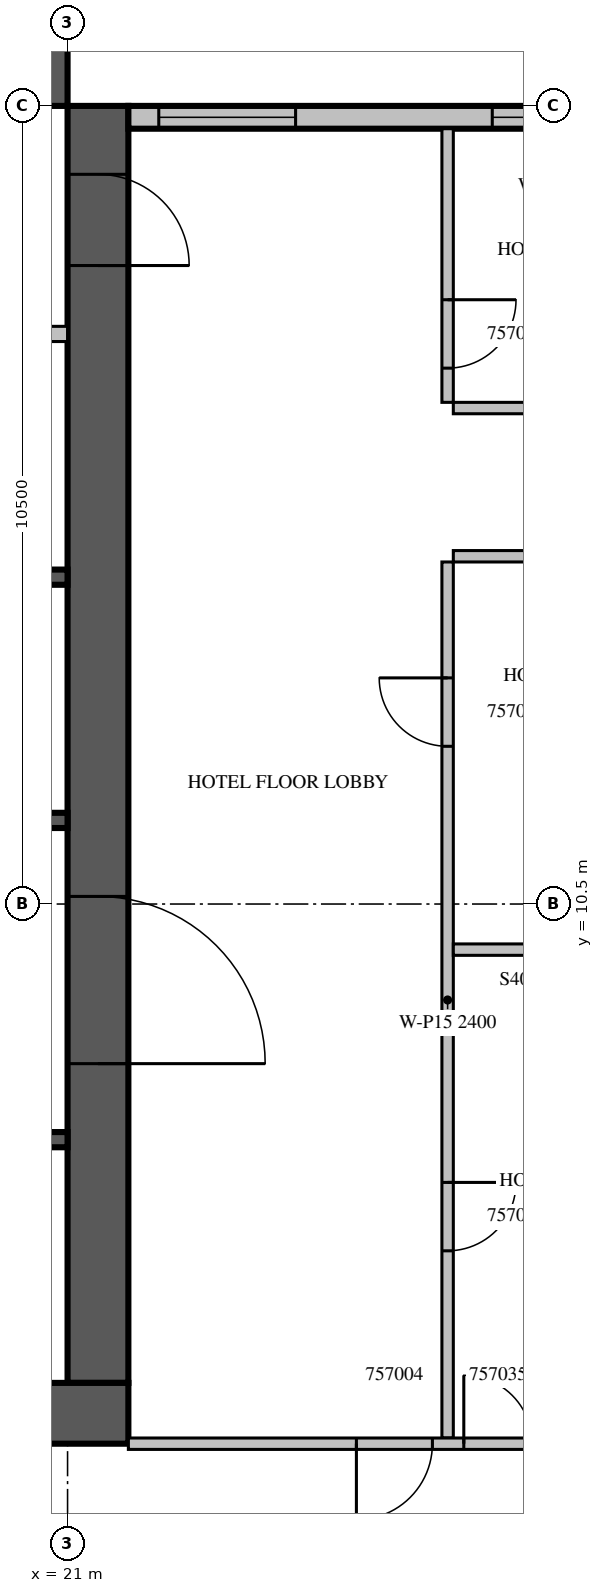
"""IFC4 building model, lengths in metres.
Left out: names, types, materials, properties, quantities, classifications, styles, units other than length and angle.
Written with IfcOpenShell. Run it as: python <this file> out.ifc"""

import sys

from ifc_helpers import new_model, si_unit, direction, frame, frame_2d, origin, place, context, subcontext, project, spatial, rectangle, extrude, source, transform, mapped, element, fill, save


model = new_model("IFC4")
c1 = context("Model", 3, precision=1e-05, world=origin(), true_north=direction((0.0, 1.0)))
c2 = subcontext(c1, "Body", "Model", "MODEL_VIEW")
j1 = project(units=[si_unit("LENGTHUNIT", "METRE"), si_unit("PLANEANGLEUNIT", "RADIAN")], contexts=[c1])
p1 = place(None, origin())
s1 = spatial("IfcSite", under=j1, at=p1, CompositionType="ELEMENT")
p2 = place(p1, origin())
s2 = spatial("IfcBuilding", under=s1, at=p2, CompositionType="ELEMENT")
p3 = place(p2, frame((0.0, 0.0, 250.0)))
s3 = spatial("IfcBuildingStorey", under=s2, at=p3, CompositionType="ELEMENT", Elevation=250.0)
m1 = source(origin(), c2, "Body", "SweptSolid", [
    extrude(rectangle(XDim=16.8, YDim=0.8, at=frame_2d((8.4, 0.0))), origin(), (0.0, 0.0, 1.0), 3.8),
])
p4 = place(p3, frame((21.4, 4.2, 0.0), z_axis=(0.0, 0.0, 1.0), x_axis=(0.0, 1.0, 0.0)))
e1 = element("IfcWall", 1, at=p4, inside=s3, PredefinedType="SHEAR", context=c2, shape_type="MappedRepresentation", body=[
    mapped(m1, transform((0.0, 0.0, 0.0), scale=1.0)),
])
m2 = source(origin(), c2, "Body", "SweptSolid", [
    extrude(rectangle(XDim=2.2, YDim=2.1, at=frame_2d((1.1, 1.05))), frame((0.0, 0.41, 0.0), z_axis=(0.0, -1.0, 0.0), x_axis=(1.0, 0.0, 0.0)), (0.0, 0.0, 1.0), 0.82),
])
p5 = place(p4, frame((4.2, 0.0, 0.0)))
e2 = element("IfcOpeningElement", 2, at=p5, cuts=e1, PredefinedType="OPENING", context=c2, shape_type="MappedRepresentation", body=[
    mapped(m2, transform((0.0, 0.0, 0.0), scale=1.0)),
])
m3 = source(origin(), c2, "Body", "SweptSolid", [
    extrude(rectangle(XDim=1.2, YDim=2.1, at=frame_2d((0.6, 1.05))), frame((0.0, 0.41, 0.0), z_axis=(0.0, -1.0, 0.0), x_axis=(1.0, 0.0, 0.0)), (0.0, 0.0, 1.0), 0.82),
])
p6 = place(p4, frame((14.7, 0.0, 0.0)))
e3 = element("IfcOpeningElement", 3, at=p6, cuts=e1, PredefinedType="OPENING", context=c2, shape_type="MappedRepresentation", body=[
    mapped(m3, transform((0.0, 0.0, 0.0), scale=1.0)),
])
m4 = source(origin(), c2, "Body", "SweptSolid", [
    extrude(rectangle(XDim=17.6, YDim=0.8, at=frame_2d((8.8, 0.0))), origin(), (0.0, 0.0, 1.0), 3.8),
])
p7 = place(p3, frame((4.2, 3.8, 0.0), z_axis=(0.0, 0.0, 1.0), x_axis=(1.0, 0.0, 0.0)))
e4 = element("IfcWall", 4, at=p7, inside=s3, PredefinedType="SHEAR", context=c2, shape_type="MappedRepresentation", body=[
    mapped(m4, transform((0.0, 0.0, 0.0), scale=1.0)),
])
m5 = source(origin(), c2, "Body", "SweptSolid", [
    extrude(rectangle(XDim=0.9, YDim=2.1, at=frame_2d((0.45, 1.05))), frame((0.0, 0.41, 0.0), z_axis=(0.0, -1.0, 0.0), x_axis=(1.0, 0.0, 0.0)), (0.0, 0.0, 1.0), 0.82),
])
p8 = place(p7, frame((11.55, 0.0, 0.0)))
e5 = element("IfcOpeningElement", 5, at=p8, cuts=e4, PredefinedType="OPENING", context=c2, shape_type="MappedRepresentation", body=[
    mapped(m5, transform((0.0, 0.0, 0.0), scale=1.0)),
])
p9 = place(p3, frame((4.2, 21.4, 0.0), z_axis=(0.0, 0.0, 1.0), x_axis=(1.0, 0.0, 0.0)))
e6 = element("IfcWall", 6, at=p9, inside=s3, PredefinedType="SHEAR", context=c2, shape_type="MappedRepresentation", body=[
    mapped(m1, transform((0.0, 0.0, 0.0), scale=1.0)),
])
p10 = place(p9, frame((6.2, 0.0, 0.0)))
e7 = element("IfcOpeningElement", 7, at=p10, cuts=e6, PredefinedType="OPENING", context=c2, shape_type="MappedRepresentation", body=[
    mapped(m3, transform((0.0, 0.0, 0.0), scale=1.0)),
])
m6 = source(origin(), c2, "Body", "SweptSolid", [
    extrude(rectangle(XDim=7.2, YDim=0.3, at=frame_2d((3.6, 0.0))), origin(), (0.0, 0.0, 1.0), 3.4),
])
p11 = place(p3, frame((29.0, 20.85, 0.0), z_axis=(0.0, 0.0, 1.0), x_axis=(-1.0, 0.0, 0.0)))
e8 = element("IfcWall", 8, at=p11, inside=s3, PredefinedType="STANDARD", context=c2, shape_type="MappedRepresentation", body=[
    mapped(m6, transform((0.0, 0.0, 0.0), scale=1.0)),
])
m7 = source(origin(), c2, "Body", "SweptSolid", [
    extrude(rectangle(XDim=1.8, YDim=2.3, at=frame_2d((0.9, 1.15))), frame((0.0, 0.16, 0.0), z_axis=(0.0, -1.0, 0.0), x_axis=(1.0, 0.0, 0.0)), (0.0, 0.0, 1.0), 0.32),
])
p12 = place(p11, frame((0.613, 0.0, 0.6)))
e9 = element("IfcOpeningElement", 9, at=p12, cuts=e8, PredefinedType="OPENING", context=c2, shape_type="MappedRepresentation", body=[
    mapped(m7, transform((0.0, 0.0, 0.0), scale=1.0)),
])
p13 = place(p11, frame((5.0, 0.0, 0.6)))
e10 = element("IfcOpeningElement", 10, at=p13, cuts=e8, PredefinedType="OPENING", context=c2, shape_type="MappedRepresentation", body=[
    mapped(m7, transform((0.0, 0.0, 0.0), scale=1.0)),
])
m8 = source(origin(), c2, "Body", "SweptSolid", [
    extrude(rectangle(XDim=2.4, YDim=0.2, at=frame_2d((1.2, 0.0))), origin(), (0.0, 0.0, 1.0), 3.8),
])
p14 = place(p3, frame((18.6, 7.4, 0.0), z_axis=(0.0, 0.0, 1.0), x_axis=(1.0, 0.0, 0.0)))
e11 = element("IfcWall", 11, at=p14, inside=s3, PredefinedType="SOLIDWALL", context=c2, shape_type="MappedRepresentation", body=[
    mapped(m8, transform((0.0, 0.0, 0.0), scale=1.0)),
])
m9 = source(origin(), c2, "Body", "SweptSolid", [
    extrude(rectangle(XDim=9.6, YDim=0.2, at=frame_2d((4.8, 0.0))), origin(), (0.0, 0.0, 1.0), 3.8),
])
p15 = place(p3, frame((11.4, 11.6, 0.0), z_axis=(0.0, 0.0, 1.0), x_axis=(1.0, 0.0, 0.0)))
e12 = element("IfcWall", 12, at=p15, inside=s3, PredefinedType="SOLIDWALL", context=c2, shape_type="MappedRepresentation", body=[
    mapped(m9, transform((0.0, 0.0, 0.0), scale=1.0)),
])
p16 = place(p3, frame((11.4, 14.8, 0.0), z_axis=(0.0, 0.0, 1.0), x_axis=(1.0, 0.0, 0.0)))
e13 = element("IfcWall", 13, at=p16, inside=s3, PredefinedType="SOLIDWALL", context=c2, shape_type="MappedRepresentation", body=[
    mapped(m9, transform((0.0, 0.0, 0.0), scale=1.0)),
])
m10 = source(origin(), c2, "Body", "SweptSolid", [
    extrude(rectangle(XDim=1.1, YDim=2.1, at=frame_2d((0.55, 1.05))), frame((0.0, 0.11, 0.0), z_axis=(0.0, -1.0, 0.0), x_axis=(1.0, 0.0, 0.0)), (0.0, 0.0, 1.0), 0.22),
])
p17 = place(p16, frame((3.05, 0.0, 0.0)))
e14 = element("IfcOpeningElement", 14, at=p17, cuts=e13, PredefinedType="OPENING", context=c2, shape_type="MappedRepresentation", body=[
    mapped(m10, transform((0.0, 0.0, 0.0), scale=1.0)),
])
p18 = place(p16, frame((5.45, 0.0, 0.0)))
e15 = element("IfcOpeningElement", 15, at=p18, cuts=e13, PredefinedType="OPENING", context=c2, shape_type="MappedRepresentation", body=[
    mapped(m10, transform((0.0, 0.0, 0.0), scale=1.0)),
])
p19 = place(p16, frame((7.85, 0.0, 0.0)))
e16 = element("IfcOpeningElement", 16, at=p19, cuts=e13, PredefinedType="OPENING", context=c2, shape_type="MappedRepresentation", body=[
    mapped(m10, transform((0.0, 0.0, 0.0), scale=1.0)),
])
m11 = source(origin(), c2, "Body", "SweptSolid", [
    extrude(rectangle(XDim=11.45, YDim=0.2, at=frame_2d((5.725, 0.0))), origin(), (0.0, 0.0, 1.0), 3.4),
])
p20 = place(p3, frame((9.55, 18.0, 0.0), z_axis=(0.0, 0.0, 1.0), x_axis=(1.0, 0.0, 0.0)))
e17 = element("IfcWall", 17, at=p20, inside=s3, PredefinedType="PARTITIONING", context=c2, shape_type="MappedRepresentation", body=[
    mapped(m11, transform((0.0, 0.0, 0.0), scale=1.0)),
])
m12 = source(origin(), c2, "Body", "SweptSolid", [
    extrude(rectangle(XDim=0.9, YDim=2.1, at=frame_2d((0.45, 1.05))), frame((0.0, 0.11, 0.0), z_axis=(0.0, -1.0, 0.0), x_axis=(1.0, 0.0, 0.0)), (0.0, 0.0, 1.0), 0.22),
])
p21 = place(p20, frame((0.725, 0.0, 0.0)))
e18 = element("IfcOpeningElement", 18, at=p21, cuts=e17, PredefinedType="OPENING", context=c2, shape_type="MappedRepresentation", body=[
    mapped(m12, transform((0.0, 0.0, 0.0), scale=1.0)),
])
p22 = place(p20, frame((2.775, 0.0, 0.0)))
e19 = element("IfcOpeningElement", 19, at=p22, cuts=e17, PredefinedType="OPENING", context=c2, shape_type="MappedRepresentation", body=[
    mapped(m12, transform((0.0, 0.0, 0.0), scale=1.0)),
])
p23 = place(p20, frame((7.35, 0.0, 0.0)))
e20 = element("IfcOpeningElement", 20, at=p23, cuts=e17, PredefinedType="OPENING", context=c2, shape_type="MappedRepresentation", body=[
    mapped(m10, transform((0.0, 0.0, 0.0), scale=1.0)),
])
m13 = source(origin(), c2, "Body", "SweptSolid", [
    extrude(rectangle(XDim=11.525, YDim=0.15, at=frame_2d((5.763, 0.0))), origin(), (0.0, 0.0, 1.0), 2.4),
])
p24 = place(p3, frame((26.0, 15.0, 0.0), z_axis=(0.0, 0.0, 1.0), x_axis=(0.0, -1.0, 0.0)))
e21 = element("IfcWall", 21, at=p24, inside=s3, PredefinedType="PARTITIONING", context=c2, shape_type="MappedRepresentation", body=[
    mapped(m13, transform((0.0, 0.0, 0.0), scale=1.0)),
])
m14 = source(origin(), c2, "Body", "SweptSolid", [
    extrude(rectangle(XDim=0.9, YDim=2.1, at=frame_2d((0.45, 1.05))), frame((0.0, 0.085, 0.0), z_axis=(0.0, -1.0, 0.0), x_axis=(1.0, 0.0, 0.0)), (0.0, 0.0, 1.0), 0.17),
])
p25 = place(p24, frame((8.162, 0.0, 0.0)))
e22 = element("IfcOpeningElement", 22, at=p25, cuts=e21, PredefinedType="OPENING", context=c2, shape_type="MappedRepresentation", body=[
    mapped(m14, transform((0.0, 0.0, 0.0), scale=1.0)),
])
p26 = place(p24, frame((1.525, 0.0, 0.0)))
e23 = element("IfcOpeningElement", 23, at=p26, cuts=e21, PredefinedType="OPENING", context=c2, shape_type="MappedRepresentation", body=[
    mapped(m14, transform((0.0, 0.0, 0.0), scale=1.0)),
])
m15 = source(origin(), c2, "Body", "SweptSolid", [
    extrude(rectangle(XDim=3.6, YDim=0.15, at=frame_2d((1.8, 0.0))), origin(), (0.0, 0.0, 1.0), 3.4),
])
p27 = place(p3, frame((26.0, 20.7, 0.0), z_axis=(0.0, 0.0, 1.0), x_axis=(0.0, -1.0, 0.0)))
e24 = element("IfcWall", 24, at=p27, inside=s3, PredefinedType="PARTITIONING", context=c2, shape_type="MappedRepresentation", body=[
    mapped(m15, transform((0.0, 0.0, 0.0), scale=1.0)),
])
p28 = place(p27, frame((2.25, 0.0, 0.0)))
e25 = element("IfcOpeningElement", 25, at=p28, cuts=e24, PredefinedType="OPENING", context=c2, shape_type="MappedRepresentation", body=[
    mapped(m14, transform((0.0, 0.0, 0.0), scale=1.0)),
])
m16 = source(origin(), c2, "Body", "SweptSolid", [
    extrude(rectangle(XDim=3.25, YDim=0.15, at=frame_2d((1.625, 0.0))), origin(), (0.0, 0.0, 1.0), 3.4),
])
for number, where, z_axis, x_axis in (
    (26, (29.325, 9.9, 0.0), (0.0, 0.0, 1.0), (-1.0, 0.0, 0.0)),
    (27, (29.325, 15.075, 0.0), (0.0, 0.0, 1.0), (-1.0, 0.0, 0.0)),
    (28, (26.075, 17.025, 0.0), (0.0, 0.0, 1.0), (1.0, 0.0, 0.0)),
):
    element("IfcWall", number, at=place(p3, frame(where, z_axis=z_axis, x_axis=x_axis)), inside=s3, PredefinedType="PARTITIONING", context=c2, shape_type="MappedRepresentation", body=[
        mapped(m16, transform((0.0, 0.0, 0.0), scale=1.0)),
    ])
m17 = source(origin(), c2, "Body", "SweptSolid", [
    extrude(rectangle(XDim=7.525, YDim=0.15, at=frame_2d((3.763, 0.0))), origin(), (0.0, 0.0, 1.0), 3.4),
])
p29 = place(p3, frame((21.8, 3.4, 0.0), z_axis=(0.0, 0.0, 1.0), x_axis=(1.0, 0.0, 0.0)))
e29 = element("IfcWall", 29, at=p29, inside=s3, PredefinedType="PARTITIONING", context=c2, shape_type="MappedRepresentation", body=[
    mapped(m17, transform((0.0, 0.0, 0.0), scale=1.0)),
])
m18 = source(origin(), c2, "Body", "SweptSolid", [
    extrude(rectangle(XDim=1.0, YDim=2.1, at=frame_2d((0.5, 1.05))), frame((0.0, 0.085, 0.0), z_axis=(0.0, -1.0, 0.0), x_axis=(1.0, 0.0, 0.0)), (0.0, 0.0, 1.0), 0.17),
])
p30 = place(p29, frame((3.0, 0.0, 0.0)))
e30 = element("IfcOpeningElement", 30, at=p30, cuts=e29, PredefinedType="OPENING", context=c2, shape_type="MappedRepresentation", body=[
    mapped(m18, transform((0.0, 0.0, 0.0), scale=1.0)),
])
p31 = place(p29, frame((4.413, 0.0, 0.0)))
e31 = element("IfcOpeningElement", 31, at=p31, cuts=e29, PredefinedType="OPENING", context=c2, shape_type="MappedRepresentation", body=[
    mapped(m14, transform((0.0, 0.0, 0.0), scale=1.0)),
])
m19 = source(origin(), c2, "Body", "SweptSolid", [
    extrude(rectangle(XDim=1.8, YDim=2.3, at=frame_2d((0.9, 1.15))), frame((0.0, 0.03, 0.0), z_axis=(0.0, -1.0, 0.0), x_axis=(1.0, 0.0, 0.0)), (0.0, 0.0, 1.0), 0.06),
])
p32 = place(p12, origin())
e32 = element("IfcWindow", 32, at=p32, inside=s3, PartitioningType="SINGLE_PANEL", PredefinedType="WINDOW", context=c2, shape_type="MappedRepresentation", body=[
    mapped(m19, transform((0.0, 0.0, 0.0), scale=1.0)),
])
fill(e9, e32)
p33 = place(p13, origin())
e33 = element("IfcWindow", 33, at=p33, inside=s3, PartitioningType="SINGLE_PANEL", PredefinedType="WINDOW", context=c2, shape_type="MappedRepresentation", body=[
    mapped(m19, transform((0.0, 0.0, 0.0), scale=1.0)),
])
fill(e10, e33)
m20 = source(origin(), c2, "Body", "SweptSolid", [
    extrude(rectangle(XDim=2.2, YDim=2.1, at=frame_2d((1.1, 1.05))), frame((0.0, 0.025, 0.0), z_axis=(0.0, -1.0, 0.0), x_axis=(1.0, 0.0, 0.0)), (0.0, 0.0, 1.0), 0.05),
])
p34 = place(p5, origin())
e34 = element("IfcDoor", 34, at=p34, inside=s3, OperationType="DOUBLE_DOOR_SINGLE_SWING", PredefinedType="DOOR", context=c2, shape_type="MappedRepresentation", body=[
    mapped(m20, transform((0.0, 0.0, 0.0), scale=1.0)),
])
fill(e2, e34)
m21 = source(origin(), c2, "Body", "SweptSolid", [
    extrude(rectangle(XDim=1.2, YDim=2.1, at=frame_2d((0.6, 1.05))), frame((0.0, 0.025, 0.0), z_axis=(0.0, -1.0, 0.0), x_axis=(1.0, 0.0, 0.0)), (0.0, 0.0, 1.0), 0.05),
])
p35 = place(p6, origin())
e35 = element("IfcDoor", 35, at=p35, inside=s3, OperationType="SINGLE_SWING_RIGHT", PredefinedType="DOOR", context=c2, shape_type="MappedRepresentation", body=[
    mapped(m21, transform((0.0, 0.0, 0.0), scale=1.0)),
])
fill(e3, e35)
m22 = source(origin(), c2, "Body", "SweptSolid", [
    extrude(rectangle(XDim=0.9, YDim=2.1, at=frame_2d((0.45, 1.05))), frame((0.0, 0.025, 0.0), z_axis=(0.0, -1.0, 0.0), x_axis=(1.0, 0.0, 0.0)), (0.0, 0.0, 1.0), 0.05),
])
p36 = place(p25, origin())
e36 = element("IfcDoor", 36, at=p36, inside=s3, OperationType="SINGLE_SWING_LEFT", PredefinedType="DOOR", context=c2, shape_type="MappedRepresentation", body=[
    mapped(m22, transform((0.0, 0.0, 0.0), scale=1.0)),
])
fill(e22, e36)
p37 = place(p26, origin())
e37 = element("IfcDoor", 37, at=p37, inside=s3, OperationType="SINGLE_SWING_RIGHT", PredefinedType="DOOR", context=c2, shape_type="MappedRepresentation", body=[
    mapped(m22, transform((0.0, 0.0, 0.0), scale=1.0)),
])
fill(e23, e37)
p38 = place(p28, origin())
e38 = element("IfcDoor", 38, at=p38, inside=s3, OperationType="SINGLE_SWING_LEFT", PredefinedType="DOOR", context=c2, shape_type="MappedRepresentation", body=[
    mapped(m22, transform((0.0, 0.0, 0.0), scale=1.0)),
])
fill(e25, e38)
m23 = source(origin(), c2, "Body", "SweptSolid", [
    extrude(rectangle(XDim=1.0, YDim=2.1, at=frame_2d((0.5, 1.05))), frame((0.0, 0.025, 0.0), z_axis=(0.0, -1.0, 0.0), x_axis=(1.0, 0.0, 0.0)), (0.0, 0.0, 1.0), 0.05),
])
p39 = place(p30, origin())
e39 = element("IfcDoor", 39, at=p39, inside=s3, OperationType="SINGLE_SWING_RIGHT", PredefinedType="DOOR", context=c2, shape_type="MappedRepresentation", body=[
    mapped(m23, transform((0.0, 0.0, 0.0), scale=1.0)),
])
fill(e30, e39)
p40 = place(p31, origin())
e40 = element("IfcDoor", 40, at=p40, inside=s3, OperationType="SINGLE_SWING_LEFT", PredefinedType="DOOR", context=c2, shape_type="MappedRepresentation", body=[
    mapped(m22, transform((0.0, 0.0, 0.0), scale=1.0)),
])
fill(e31, e40)
save(model, sys.argv[1])
